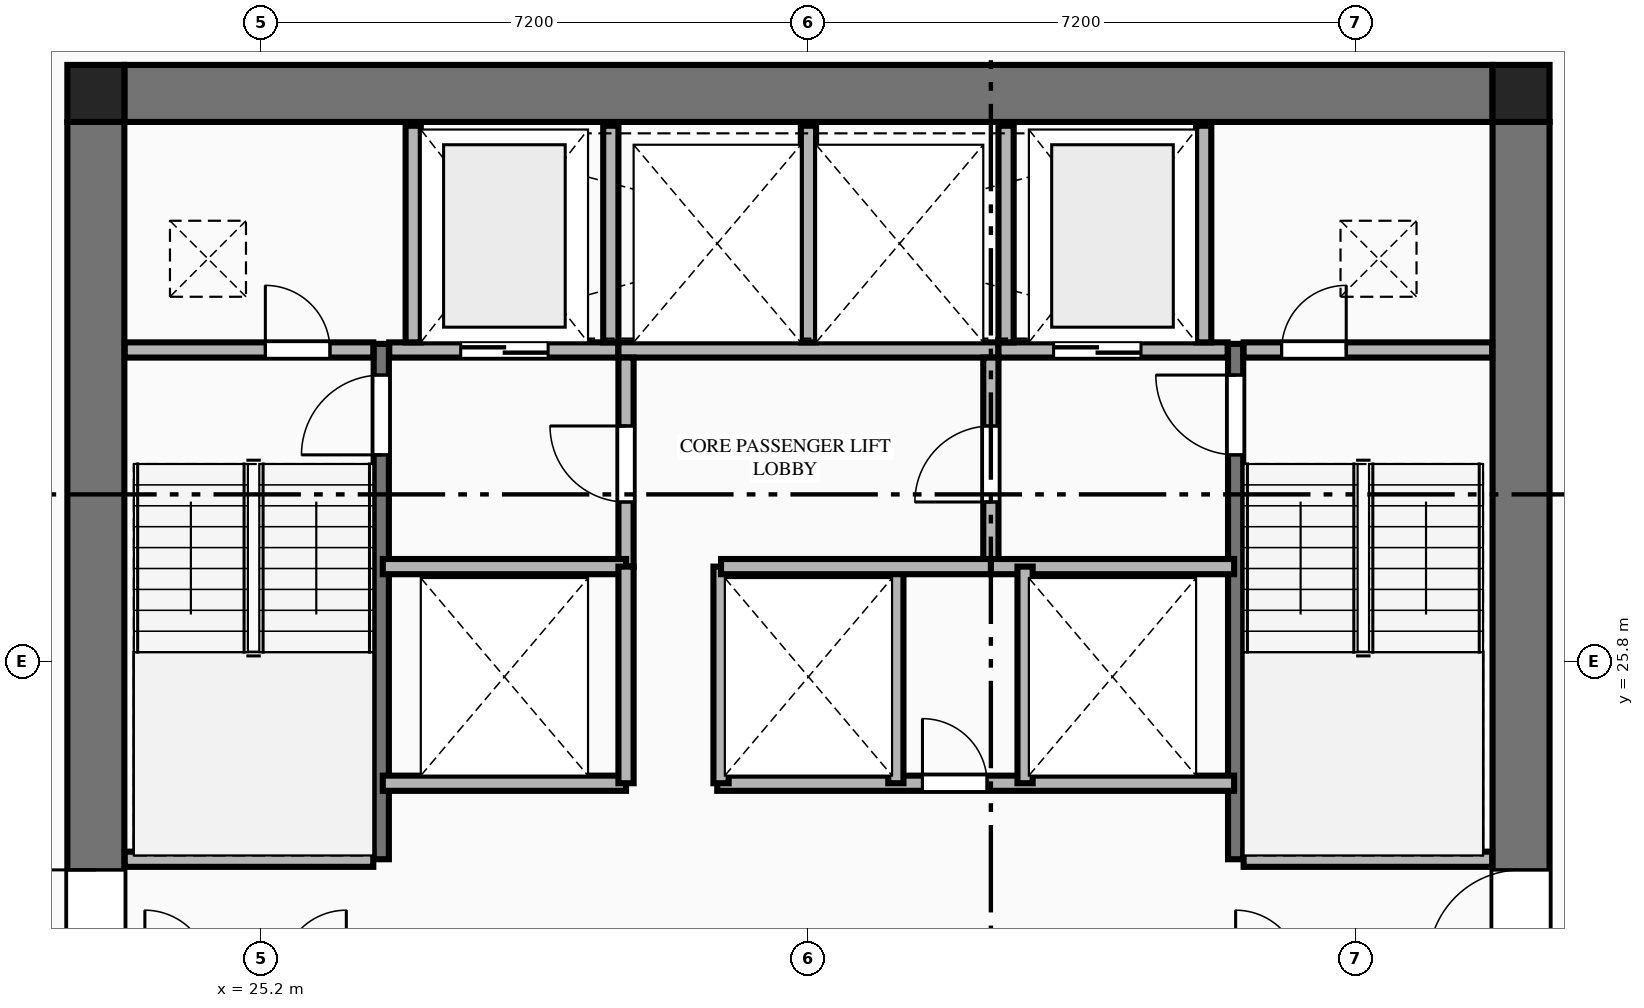
"""IFC4 building model, lengths in metres.
Left out: names, types, materials, properties, quantities, classifications, styles, units other than length and angle.
Written with IfcOpenShell. Run it as: python <this file> out.ifc"""

import sys

from ifc_helpers import new_model, si_unit, direction, frame, frame_2d, origin, origin_2d, place, context, subcontext, project, spatial, rectangle, extrude, element, fill, save


model = new_model("IFC4")
c1 = context("Model", 3, precision=1e-05, world=origin(), true_north=direction((0.0, 1.0)))
c2 = subcontext(c1, "Body", "Model", "MODEL_VIEW")
j1 = project(units=[si_unit("LENGTHUNIT", "METRE"), si_unit("PLANEANGLEUNIT", "RADIAN")], contexts=[c1])
p1 = place(None, origin())
s1 = spatial("IfcSite", under=j1, at=p1, CompositionType="ELEMENT")
p2 = place(p1, origin())
s2 = spatial("IfcBuilding", under=s1, at=p2, CompositionType="ELEMENT")
p3 = place(p2, frame((0.0, 0.0, 87.1)))
s3 = spatial("IfcBuildingStorey", under=s2, at=p3, CompositionType="ELEMENT", Elevation=87.1)
for number, where, z_axis, x_axis in (
    (1, (41.775, 33.275, 0.0), (0.0, 0.0, 1.0), (1.0, 0.0, 0.0)),
    (2, (23.025, 33.275, 0.0), (0.0, 0.0, 1.0), (1.0, 0.0, 0.0)),
):
    element("IfcColumn", number, at=place(p3, frame(where, z_axis=z_axis, x_axis=x_axis)), inside=s3, PredefinedType="COLUMN", context=c2, shape_type="SweptSolid", body=[
        extrude(rectangle(XDim=0.75, YDim=0.75, at=origin_2d()), origin(), (0.0, 0.0, 1.0), 3.55),
    ])
p4 = place(p3, frame((23.4, 33.275, 0.0), z_axis=(0.0, 0.0, 1.0), x_axis=(1.0, 0.0, 0.0)))
e3 = element("IfcWall", 3, at=p4, inside=s3, PredefinedType="SHEAR", context=c2, shape_type="SweptSolid", body=[
    extrude(rectangle(XDim=18.0, YDim=0.75, at=frame_2d((9.0, 0.0))), origin(), (0.0, 0.0, 1.0), 3.33),
])
p5 = place(p3, frame((23.025, 18.9, 0.0), z_axis=(0.0, 0.0, 1.0), x_axis=(0.0, 1.0, 0.0)))
e4 = element("IfcWall", 4, at=p5, inside=s3, PredefinedType="SHEAR", context=c2, shape_type="SweptSolid", body=[
    extrude(rectangle(XDim=14.0, YDim=0.75, at=frame_2d((7.0, 0.0))), origin(), (0.0, 0.0, 1.0), 3.33),
])
p6 = place(p5, frame((2.94, 0.0, 0.0)))
e5 = element("IfcOpeningElement", 5, at=p6, cuts=e4, PredefinedType="OPENING", context=c2, shape_type="SweptSolid", body=[
    extrude(rectangle(XDim=1.22, YDim=2.25, at=frame_2d((0.61, 1.125))), frame((0.0, 0.385, 0.0), z_axis=(0.0, -1.0, 0.0), x_axis=(1.0, 0.0, 0.0)), (0.0, 0.0, 1.0), 0.77),
])
p7 = place(p3, frame((41.775, 18.9, 0.0), z_axis=(0.0, 0.0, 1.0), x_axis=(0.0, 1.0, 0.0)))
e6 = element("IfcWall", 6, at=p7, inside=s3, PredefinedType="SHEAR", context=c2, shape_type="SweptSolid", body=[
    extrude(rectangle(XDim=14.0, YDim=0.75, at=frame_2d((7.0, 0.0))), origin(), (0.0, 0.0, 1.0), 3.33),
])
p8 = place(p7, frame((2.94, 0.0, 0.0)))
e7 = element("IfcOpeningElement", 7, at=p8, cuts=e6, PredefinedType="OPENING", context=c2, shape_type="SweptSolid", body=[
    extrude(rectangle(XDim=1.22, YDim=2.25, at=frame_2d((0.61, 1.125))), frame((0.0, 0.385, 0.0), z_axis=(0.0, -1.0, 0.0), x_axis=(1.0, 0.0, 0.0)), (0.0, 0.0, 1.0), 0.77),
])
p9 = place(p3, frame((26.78, 23.2, 0.0), z_axis=(0.0, 0.0, 1.0), x_axis=(0.0, 1.0, 0.0)))
e8 = element("IfcWall", 8, at=p9, inside=s3, PredefinedType="SHEAR", context=c2, shape_type="SweptSolid", body=[
    extrude(rectangle(XDim=6.78, YDim=0.2, at=frame_2d((3.39, 0.0))), origin(), (0.0, 0.0, 1.0), 3.55),
])
p10 = place(p9, frame((5.32, 0.0, 0.0)))
e9 = element("IfcOpeningElement", 9, at=p10, cuts=e8, PredefinedType="OPENING", context=c2, shape_type="SweptSolid", body=[
    extrude(rectangle(XDim=1.05, YDim=2.15, at=frame_2d((0.525, 1.075))), frame((0.0, 0.11, 0.0), z_axis=(0.0, -1.0, 0.0), x_axis=(1.0, 0.0, 0.0)), (0.0, 0.0, 1.0), 0.22),
])
p11 = place(p3, frame((23.405, 23.2, 0.0), z_axis=(0.0, 0.0, 1.0), x_axis=(1.0, 0.0, 0.0)))
e10 = element("IfcWall", 10, at=p11, inside=s3, PredefinedType="PLUMBINGWALL", context=c2, shape_type="SweptSolid", body=[
    extrude(rectangle(XDim=3.27, YDim=0.2, at=frame_2d((1.635, 0.0))), origin(), (0.0, 0.0, 1.0), 3.33),
])
p12 = place(p3, frame((38.02, 23.2, 0.0), z_axis=(0.0, 0.0, 1.0), x_axis=(0.0, 1.0, 0.0)))
e11 = element("IfcWall", 11, at=p12, inside=s3, PredefinedType="SHEAR", context=c2, shape_type="SweptSolid", body=[
    extrude(rectangle(XDim=6.78, YDim=0.2, at=frame_2d((3.39, 0.0))), origin(), (0.0, 0.0, 1.0), 3.55),
])
p13 = place(p12, frame((5.32, 0.0, 0.0)))
e12 = element("IfcOpeningElement", 12, at=p13, cuts=e11, PredefinedType="OPENING", context=c2, shape_type="SweptSolid", body=[
    extrude(rectangle(XDim=1.05, YDim=2.15, at=frame_2d((0.525, 1.075))), frame((0.0, 0.11, 0.0), z_axis=(0.0, -1.0, 0.0), x_axis=(1.0, 0.0, 0.0)), (0.0, 0.0, 1.0), 0.22),
])
p14 = place(p3, frame((38.125, 23.2, 0.0), z_axis=(0.0, 0.0, 1.0), x_axis=(1.0, 0.0, 0.0)))
e13 = element("IfcWall", 13, at=p14, inside=s3, PredefinedType="PLUMBINGWALL", context=c2, shape_type="SweptSolid", body=[
    extrude(rectangle(XDim=3.27, YDim=0.2, at=frame_2d((1.635, 0.0))), origin(), (0.0, 0.0, 1.0), 3.33),
])
p15 = place(p3, frame((23.405, 29.9, 0.0), z_axis=(0.0, 0.0, 1.0), x_axis=(1.0, 0.0, 0.0)))
e14 = element("IfcWall", 14, at=p15, inside=s3, PredefinedType="PLUMBINGWALL", context=c2, shape_type="SweptSolid", body=[
    extrude(rectangle(XDim=3.27, YDim=0.2, at=frame_2d((1.635, 0.0))), origin(), (0.0, 0.0, 1.0), 3.33),
])
p16 = place(p15, frame((1.85, 0.0, 0.0)))
e15 = element("IfcOpeningElement", 15, at=p16, cuts=e14, PredefinedType="OPENING", context=c2, shape_type="SweptSolid", body=[
    extrude(rectangle(XDim=0.85, YDim=2.05, at=frame_2d((0.425, 1.025))), frame((0.0, 0.11, 0.0), z_axis=(0.0, -1.0, 0.0), x_axis=(1.0, 0.0, 0.0)), (0.0, 0.0, 1.0), 0.22),
])
p17 = place(p3, frame((26.885, 29.9, 0.0), z_axis=(0.0, 0.0, 1.0), x_axis=(1.0, 0.0, 0.0)))
e16 = element("IfcWall", 16, at=p17, inside=s3, PredefinedType="PLUMBINGWALL", context=c2, shape_type="SweptSolid", body=[
    extrude(rectangle(XDim=3.015, YDim=0.2, at=frame_2d((1.507, 0.0))), origin(), (0.0, 0.0, 1.0), 3.33),
])
p18 = place(p17, frame((0.94, 0.0, 0.0)))
e17 = element("IfcOpeningElement", 17, at=p18, cuts=e16, PredefinedType="OPENING", context=c2, shape_type="SweptSolid", body=[
    extrude(rectangle(XDim=1.15, YDim=2.2, at=frame_2d((0.575, 1.1))), frame((0.0, 0.11, 0.0), z_axis=(0.0, -1.0, 0.0), x_axis=(1.0, 0.0, 0.0)), (0.0, 0.0, 1.0), 0.22),
])
p19 = place(p3, frame((29.9, 29.9, 0.0), z_axis=(0.0, 0.0, 1.0), x_axis=(1.0, 0.0, 0.0)))
e18 = element("IfcWall", 18, at=p19, inside=s3, PredefinedType="PLUMBINGWALL", context=c2, shape_type="SweptSolid", body=[
    extrude(rectangle(XDim=5.0, YDim=0.2, at=frame_2d((2.5, 0.0))), origin(), (0.0, 0.0, 1.0), 3.33),
])
p20 = place(p3, frame((34.9, 29.9, 0.0), z_axis=(0.0, 0.0, 1.0), x_axis=(1.0, 0.0, 0.0)))
e19 = element("IfcWall", 19, at=p20, inside=s3, PredefinedType="PLUMBINGWALL", context=c2, shape_type="SweptSolid", body=[
    extrude(rectangle(XDim=3.015, YDim=0.2, at=frame_2d((1.508, 0.0))), origin(), (0.0, 0.0, 1.0), 3.33),
])
p21 = place(p20, frame((0.725, 0.0, 0.0)))
e20 = element("IfcOpeningElement", 20, at=p21, cuts=e19, PredefinedType="OPENING", context=c2, shape_type="SweptSolid", body=[
    extrude(rectangle(XDim=1.15, YDim=2.2, at=frame_2d((0.575, 1.1))), frame((0.0, 0.11, 0.0), z_axis=(0.0, -1.0, 0.0), x_axis=(1.0, 0.0, 0.0)), (0.0, 0.0, 1.0), 0.22),
])
p22 = place(p3, frame((38.125, 29.9, 0.0), z_axis=(0.0, 0.0, 1.0), x_axis=(1.0, 0.0, 0.0)))
e21 = element("IfcWall", 21, at=p22, inside=s3, PredefinedType="PLUMBINGWALL", context=c2, shape_type="SweptSolid", body=[
    extrude(rectangle(XDim=3.27, YDim=0.2, at=frame_2d((1.635, 0.0))), origin(), (0.0, 0.0, 1.0), 3.33),
])
p23 = place(p22, frame((0.5, 0.0, 0.0)))
e22 = element("IfcOpeningElement", 22, at=p23, cuts=e21, PredefinedType="OPENING", context=c2, shape_type="SweptSolid", body=[
    extrude(rectangle(XDim=0.85, YDim=2.05, at=frame_2d((0.425, 1.025))), frame((0.0, 0.11, 0.0), z_axis=(0.0, -1.0, 0.0), x_axis=(1.0, 0.0, 0.0)), (0.0, 0.0, 1.0), 0.22),
])
for number, where, z_axis, x_axis in (
    (23, (27.2, 30.0, 0.0), (0.0, 0.0, 1.0), (0.0, 1.0, 0.0)),
    (24, (29.8, 30.0, 0.0), (0.0, 0.0, 1.0), (0.0, 1.0, 0.0)),
    (25, (32.4, 30.0, 0.0), (0.0, 0.0, 1.0), (0.0, 1.0, 0.0)),
    (26, (35.0, 30.0, 0.0), (0.0, 0.0, 1.0), (0.0, 1.0, 0.0)),
    (27, (37.6, 30.0, 0.0), (0.0, 0.0, 1.0), (0.0, 1.0, 0.0)),
):
    element("IfcWall", number, at=place(p3, frame(where, z_axis=z_axis, x_axis=x_axis)), inside=s3, PredefinedType="PLUMBINGWALL", context=c2, shape_type="SweptSolid", body=[
        extrude(rectangle(XDim=2.85, YDim=0.2, at=frame_2d((1.425, 0.0))), origin(), (0.0, 0.0, 1.0), 3.33),
    ])
p24 = place(p3, frame((30.0, 27.05, 0.0), z_axis=(0.0, 0.0, 1.0), x_axis=(0.0, 1.0, 0.0)))
e28 = element("IfcWall", 28, at=p24, inside=s3, PredefinedType="PLUMBINGWALL", context=c2, shape_type="SweptSolid", body=[
    extrude(rectangle(XDim=2.75, YDim=0.2, at=frame_2d((1.375, 0.0))), origin(), (0.0, 0.0, 1.0), 3.33),
])
p25 = place(p24, frame((0.85, 0.0, 0.0)))
e29 = element("IfcOpeningElement", 29, at=p25, cuts=e28, PredefinedType="OPENING", context=c2, shape_type="SweptSolid", body=[
    extrude(rectangle(XDim=1.0, YDim=2.15, at=frame_2d((0.5, 1.075))), frame((0.0, 0.11, 0.0), z_axis=(0.0, -1.0, 0.0), x_axis=(1.0, 0.0, 0.0)), (0.0, 0.0, 1.0), 0.22),
])
p26 = place(p3, frame((26.8, 27.05, 0.0), z_axis=(0.0, 0.0, 1.0), x_axis=(1.0, 0.0, 0.0)))
e30 = element("IfcWall", 30, at=p26, inside=s3, PredefinedType="PLUMBINGWALL", context=c2, shape_type="SweptSolid", body=[
    extrude(rectangle(XDim=3.2, YDim=0.2, at=frame_2d((1.6, 0.0))), origin(), (0.0, 0.0, 1.0), 3.33),
])
p27 = place(p3, frame((34.8, 27.05, 0.0), z_axis=(0.0, 0.0, 1.0), x_axis=(0.0, 1.0, 0.0)))
e31 = element("IfcWall", 31, at=p27, inside=s3, PredefinedType="PLUMBINGWALL", context=c2, shape_type="SweptSolid", body=[
    extrude(rectangle(XDim=2.75, YDim=0.2, at=frame_2d((1.375, 0.0))), origin(), (0.0, 0.0, 1.0), 3.33),
])
p28 = place(p27, frame((0.85, 0.0, 0.0)))
e32 = element("IfcOpeningElement", 32, at=p28, cuts=e31, PredefinedType="OPENING", context=c2, shape_type="SweptSolid", body=[
    extrude(rectangle(XDim=1.0, YDim=2.15, at=frame_2d((0.5, 1.075))), frame((0.0, 0.11, 0.0), z_axis=(0.0, -1.0, 0.0), x_axis=(1.0, 0.0, 0.0)), (0.0, 0.0, 1.0), 0.22),
])
for number, where, z_axis, x_axis in (
    (33, (34.8, 27.05, 0.0), (0.0, 0.0, 1.0), (1.0, 0.0, 0.0)),
    (34, (26.8, 24.2, 0.0), (0.0, 0.0, 1.0), (1.0, 0.0, 0.0)),
):
    element("IfcWall", number, at=place(p3, frame(where, z_axis=z_axis, x_axis=x_axis)), inside=s3, PredefinedType="PLUMBINGWALL", context=c2, shape_type="SweptSolid", body=[
        extrude(rectangle(XDim=3.2, YDim=0.2, at=frame_2d((1.6, 0.0))), origin(), (0.0, 0.0, 1.0), 3.33),
    ])
p29 = place(p3, frame((30.0, 24.2, 0.0), z_axis=(0.0, 0.0, 1.0), x_axis=(0.0, 1.0, 0.0)))
e35 = element("IfcWall", 35, at=p29, inside=s3, PredefinedType="PLUMBINGWALL", context=c2, shape_type="SweptSolid", body=[
    extrude(rectangle(XDim=2.85, YDim=0.2, at=frame_2d((1.425, 0.0))), origin(), (0.0, 0.0, 1.0), 3.33),
])
p30 = place(p3, frame((31.2, 24.2, 0.0), z_axis=(0.0, 0.0, 1.0), x_axis=(1.0, 0.0, 0.0)))
e36 = element("IfcWall", 36, at=p30, inside=s3, PredefinedType="PLUMBINGWALL", context=c2, shape_type="SweptSolid", body=[
    extrude(rectangle(XDim=6.8, YDim=0.2, at=frame_2d((3.4, 0.0))), origin(), (0.0, 0.0, 1.0), 3.33),
])
p31 = place(p30, frame((2.7, 0.0, 0.0)))
e37 = element("IfcOpeningElement", 37, at=p31, cuts=e36, PredefinedType="OPENING", context=c2, shape_type="SweptSolid", body=[
    extrude(rectangle(XDim=0.85, YDim=2.05, at=frame_2d((0.425, 1.025))), frame((0.0, 0.11, 0.0), z_axis=(0.0, -1.0, 0.0), x_axis=(1.0, 0.0, 0.0)), (0.0, 0.0, 1.0), 0.22),
])
for number, where, z_axis, x_axis in (
    (38, (31.25, 24.2, 0.0), (0.0, 0.0, 1.0), (0.0, 1.0, 0.0)),
    (39, (33.55, 24.2, 0.0), (0.0, 0.0, 1.0), (0.0, 1.0, 0.0)),
    (40, (35.25, 24.2, 0.0), (0.0, 0.0, 1.0), (0.0, 1.0, 0.0)),
):
    element("IfcWall", number, at=place(p3, frame(where, z_axis=z_axis, x_axis=x_axis)), inside=s3, PredefinedType="PLUMBINGWALL", context=c2, shape_type="SweptSolid", body=[
        extrude(rectangle(XDim=2.85, YDim=0.2, at=frame_2d((1.425, 0.0))), origin(), (0.0, 0.0, 1.0), 3.33),
    ])
p32 = place(p3, frame((31.25, 27.05, 0.0), z_axis=(0.0, 0.0, 1.0), x_axis=(1.0, 0.0, 0.0)))
e41 = element("IfcWall", 41, at=p32, inside=s3, PredefinedType="PLUMBINGWALL", context=c2, shape_type="SweptSolid", body=[
    extrude(rectangle(XDim=3.55, YDim=0.2, at=frame_2d((1.775, 0.0))), origin(), (0.0, 0.0, 1.0), 3.33),
])
p33 = place(p6, origin())
e42 = element("IfcDoor", 42, at=p33, inside=s3, OperationType="SINGLE_SWING_RIGHT", PredefinedType="DOOR", context=c2, shape_type="SweptSolid", body=[
    extrude(rectangle(XDim=1.22, YDim=2.25, at=frame_2d((0.61, 1.125))), frame((0.0, 0.025, 0.0), z_axis=(0.0, -1.0, 0.0), x_axis=(1.0, 0.0, 0.0)), (0.0, 0.0, 1.0), 0.05),
])
fill(e5, e42)
p34 = place(p8, origin())
e43 = element("IfcDoor", 43, at=p34, inside=s3, OperationType="SINGLE_SWING_LEFT", PredefinedType="DOOR", context=c2, shape_type="SweptSolid", body=[
    extrude(rectangle(XDim=1.22, YDim=2.25, at=frame_2d((0.61, 1.125))), frame((0.0, 0.025, 0.0), z_axis=(0.0, -1.0, 0.0), x_axis=(1.0, 0.0, 0.0)), (0.0, 0.0, 1.0), 0.05),
])
fill(e7, e43)
p35 = place(p10, origin())
e44 = element("IfcDoor", 44, at=p35, inside=s3, OperationType="SINGLE_SWING_LEFT", PredefinedType="DOOR", context=c2, shape_type="SweptSolid", body=[
    extrude(rectangle(XDim=1.05, YDim=2.15, at=frame_2d((0.525, 1.075))), frame((0.0, 0.025, 0.0), z_axis=(0.0, -1.0, 0.0), x_axis=(1.0, 0.0, 0.0)), (0.0, 0.0, 1.0), 0.05),
])
fill(e9, e44)
p36 = place(p13, origin())
e45 = element("IfcDoor", 45, at=p36, inside=s3, OperationType="SINGLE_SWING_RIGHT", PredefinedType="DOOR", context=c2, shape_type="SweptSolid", body=[
    extrude(rectangle(XDim=1.05, YDim=2.15, at=frame_2d((0.525, 1.075))), frame((0.0, 0.025, 0.0), z_axis=(0.0, -1.0, 0.0), x_axis=(1.0, 0.0, 0.0)), (0.0, 0.0, 1.0), 0.05),
])
fill(e12, e45)
p37 = place(p16, origin())
e46 = element("IfcDoor", 46, at=p37, inside=s3, OperationType="SINGLE_SWING_LEFT", PredefinedType="DOOR", context=c2, shape_type="SweptSolid", body=[
    extrude(rectangle(XDim=0.85, YDim=2.05, at=frame_2d((0.425, 1.025))), frame((0.0, 0.025, 0.0), z_axis=(0.0, -1.0, 0.0), x_axis=(1.0, 0.0, 0.0)), (0.0, 0.0, 1.0), 0.05),
])
fill(e15, e46)
p38 = place(p23, origin())
e47 = element("IfcDoor", 47, at=p38, inside=s3, OperationType="SINGLE_SWING_RIGHT", PredefinedType="DOOR", context=c2, shape_type="SweptSolid", body=[
    extrude(rectangle(XDim=0.85, YDim=2.05, at=frame_2d((0.425, 1.025))), frame((0.0, 0.025, 0.0), z_axis=(0.0, -1.0, 0.0), x_axis=(1.0, 0.0, 0.0)), (0.0, 0.0, 1.0), 0.05),
])
fill(e22, e47)
p39 = place(p18, origin())
e48 = element("IfcDoor", 48, at=p39, inside=s3, OperationType="DOUBLE_DOOR_SLIDING", PredefinedType="DOOR", context=c2, shape_type="SweptSolid", body=[
    extrude(rectangle(XDim=1.15, YDim=2.2, at=frame_2d((0.575, 1.1))), frame((0.0, 0.025, 0.0), z_axis=(0.0, -1.0, 0.0), x_axis=(1.0, 0.0, 0.0)), (0.0, 0.0, 1.0), 0.05),
])
fill(e17, e48)
p40 = place(p21, origin())
e49 = element("IfcDoor", 49, at=p40, inside=s3, OperationType="DOUBLE_DOOR_SLIDING", PredefinedType="DOOR", context=c2, shape_type="SweptSolid", body=[
    extrude(rectangle(XDim=1.15, YDim=2.2, at=frame_2d((0.575, 1.1))), frame((0.0, 0.025, 0.0), z_axis=(0.0, -1.0, 0.0), x_axis=(1.0, 0.0, 0.0)), (0.0, 0.0, 1.0), 0.05),
])
fill(e20, e49)
p41 = place(p25, origin())
e50 = element("IfcDoor", 50, at=p41, inside=s3, OperationType="SINGLE_SWING_RIGHT", PredefinedType="DOOR", context=c2, shape_type="SweptSolid", body=[
    extrude(rectangle(XDim=1.0, YDim=2.15, at=frame_2d((0.5, 1.075))), frame((0.0, 0.025, 0.0), z_axis=(0.0, -1.0, 0.0), x_axis=(1.0, 0.0, 0.0)), (0.0, 0.0, 1.0), 0.05),
])
fill(e29, e50)
p42 = place(p28, origin())
e51 = element("IfcDoor", 51, at=p42, inside=s3, OperationType="SINGLE_SWING_LEFT", PredefinedType="DOOR", context=c2, shape_type="SweptSolid", body=[
    extrude(rectangle(XDim=1.0, YDim=2.15, at=frame_2d((0.5, 1.075))), frame((0.0, 0.025, 0.0), z_axis=(0.0, -1.0, 0.0), x_axis=(1.0, 0.0, 0.0)), (0.0, 0.0, 1.0), 0.05),
])
fill(e32, e51)
p43 = place(p31, origin())
e52 = element("IfcDoor", 52, at=p43, inside=s3, OperationType="SINGLE_SWING_LEFT", PredefinedType="DOOR", context=c2, shape_type="SweptSolid", body=[
    extrude(rectangle(XDim=0.85, YDim=2.05, at=frame_2d((0.425, 1.025))), frame((0.0, 0.025, 0.0), z_axis=(0.0, -1.0, 0.0), x_axis=(1.0, 0.0, 0.0)), (0.0, 0.0, 1.0), 0.05),
])
fill(e37, e52)
save(model, sys.argv[1])
